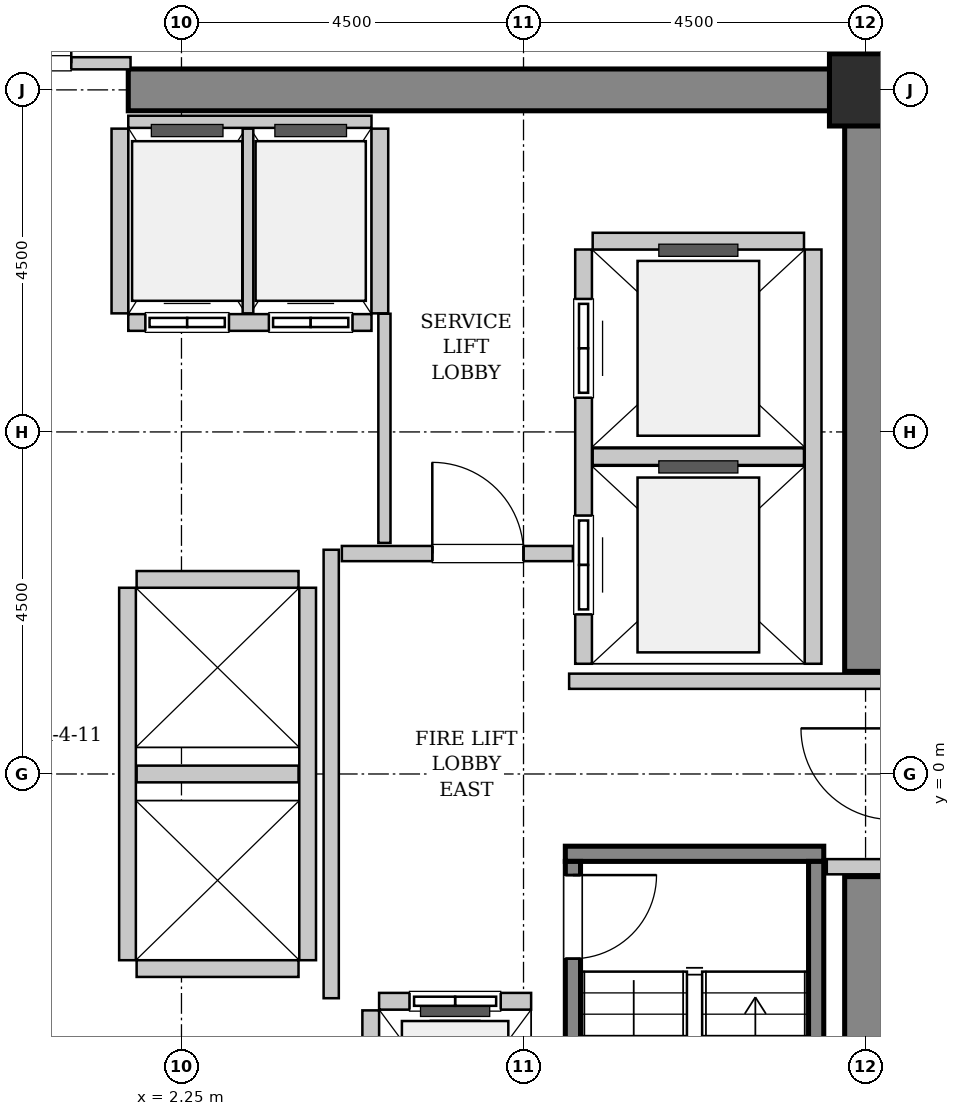
"""IFC4 building model, lengths in metres.
Left out: names, types, materials, properties, quantities, classifications, styles, units other than length and angle.
Written with IfcOpenShell. Run it as: python <this file> out.ifc"""

import sys

from ifc_helpers import new_model, si_unit, direction, frame, frame_2d, origin, origin_2d, place, context, subcontext, project, spatial, rectangle, hollow_rectangle, extrude, source, transform, mapped, element, fill, save


model = new_model("IFC4")
c1 = context("Model", 3, precision=1e-05, world=origin(), true_north=direction((0.0, 1.0)))
c2 = subcontext(c1, "Body", "Model", "MODEL_VIEW")
j1 = project(units=[si_unit("LENGTHUNIT", "METRE"), si_unit("PLANEANGLEUNIT", "RADIAN")], contexts=[c1])
p1 = place(None, origin())
s1 = spatial("IfcSite", under=j1, at=p1, CompositionType="ELEMENT")
p2 = place(p1, origin())
s2 = spatial("IfcBuilding", under=s1, at=p2, CompositionType="ELEMENT")
p3 = place(p2, frame((0.0, 0.0, 102.2)))
s3 = spatial("IfcBuildingStorey", under=s2, at=p3, CompositionType="ELEMENT", Elevation=102.2)
m1 = source(origin(), c2, "Body", "SweptSolid", [
    extrude(rectangle(XDim=9.975, YDim=0.55, at=frame_2d((4.987, 0.0))), origin(), (0.0, 0.0, 1.0), 3.8),
])
p4 = place(p3, frame((1.55, 9.0, 0.0), z_axis=(0.0, 0.0, 1.0), x_axis=(1.0, 0.0, 0.0)))
e1 = element("IfcWall", 1, at=p4, inside=s3, PredefinedType="SHEAR", context=c2, shape_type="MappedRepresentation", body=[
    mapped(m1, transform((0.0, 0.0, 0.0), x_axis=(1.0, 0.0, 0.0), y_axis=(0.0, 1.0, 0.0), z_axis=(0.0, 0.0, 1.0), scale=1.0)),
])
m2 = source(origin(), c2, "Body", "SweptSolid", [
    extrude(rectangle(XDim=7.375, YDim=0.55, at=frame_2d((3.688, 0.0))), origin(), (0.0, 0.0, 1.0), 3.8),
])
for number, where, z_axis, x_axis in (
    (2, (11.25, -8.725, 0.0), (0.0, 0.0, 1.0), (0.0, 1.0, 0.0)),
    (3, (11.25, 1.35, 0.0), (0.0, 0.0, 1.0), (0.0, 1.0, 0.0)),
):
    element("IfcWall", number, at=place(p3, frame(where, z_axis=z_axis, x_axis=x_axis)), inside=s3, PredefinedType="SHEAR", context=c2, shape_type="MappedRepresentation", body=[
        mapped(m2, transform((0.0, 0.0, 0.0), x_axis=(1.0, 0.0, 0.0), y_axis=(0.0, 1.0, 0.0), z_axis=(0.0, 0.0, 1.0), scale=1.0)),
    ])
m3 = source(origin(), c2, "Body", "SweptSolid", [
    extrude(hollow_rectangle(XDim=0.95, YDim=0.95, WallThickness=0.045, InnerFilletRadius=0.045, OuterFilletRadius=0.09, at=origin_2d()), origin(), (0.0, 0.0, 1.0), 3.8),
])
p5 = place(p3, frame((11.25, 9.0, 0.0), z_axis=(0.0, 0.0, 1.0), x_axis=(1.0, 0.0, 0.0)))
e4 = element("IfcColumn", 4, at=p5, inside=s3, PredefinedType="COLUMN", context=c2, shape_type="MappedRepresentation", body=[
    mapped(m3, transform((0.0, 0.0, 0.0), x_axis=(1.0, 0.0, 0.0), y_axis=(0.0, 1.0, 0.0), z_axis=(0.0, 0.0, 1.0), scale=1.0)),
])
m4 = source(origin(), c2, "Body", "SweptSolid", [
    extrude(rectangle(XDim=3.4, YDim=0.2, at=frame_2d((1.7, 0.0))), origin(), (0.0, 0.0, 1.0), 3.8),
])
p6 = place(p3, frame((7.3, -1.05, 0.0), z_axis=(0.0, 0.0, 1.0), x_axis=(1.0, 0.0, 0.0)))
e5 = element("IfcWall", 5, at=p6, inside=s3, PredefinedType="SOLIDWALL", context=c2, shape_type="MappedRepresentation", body=[
    mapped(m4, transform((0.0, 0.0, 0.0), x_axis=(1.0, 0.0, 0.0), y_axis=(0.0, 1.0, 0.0), z_axis=(0.0, 0.0, 1.0), scale=1.0)),
])
m5 = source(origin(), c2, "Body", "SweptSolid", [
    extrude(rectangle(XDim=7.1, YDim=0.2, at=frame_2d((3.55, 0.0))), origin(), (0.0, 0.0, 1.0), 3.8),
])
p7 = place(p3, frame((7.4, -1.15, 0.0), z_axis=(0.0, 0.0, 1.0), x_axis=(0.0, -1.0, 0.0)))
e6 = element("IfcWall", 6, at=p7, inside=s3, PredefinedType="SOLIDWALL", context=c2, shape_type="MappedRepresentation", body=[
    mapped(m5, transform((0.0, 0.0, 0.0), x_axis=(1.0, 0.0, 0.0), y_axis=(0.0, 1.0, 0.0), z_axis=(0.0, 0.0, 1.0), scale=1.0)),
])
p8 = place(p7, frame((0.18, 0.0, 0.0)))
e7 = element("IfcOpeningElement", 7, at=p8, cuts=e6, PredefinedType="OPENING", context=c2, shape_type="SweptSolid", body=[
    extrude(rectangle(XDim=1.1, YDim=2.15, at=frame_2d((0.55, 1.075))), frame((0.0, 0.11, 0.0), z_axis=(0.0, -1.0, 0.0), x_axis=(1.0, 0.0, 0.0)), (0.0, 0.0, 1.0), 0.22),
])
p9 = place(p3, frame((10.6, -1.15, 0.0), z_axis=(0.0, 0.0, 1.0), x_axis=(0.0, -1.0, 0.0)))
e8 = element("IfcWall", 8, at=p9, inside=s3, PredefinedType="SOLIDWALL", context=c2, shape_type="MappedRepresentation", body=[
    mapped(m5, transform((0.0, 0.0, 0.0), x_axis=(1.0, 0.0, 0.0), y_axis=(0.0, 1.0, 0.0), z_axis=(0.0, 0.0, 1.0), scale=1.0)),
])
m6 = source(origin(), c2, "Body", "SweptSolid", [
    extrude(rectangle(XDim=2.0, YDim=0.22, at=frame_2d((1.0, 0.0))), origin(), (0.0, 0.0, 1.0), 3.535),
])
p10 = place(p3, frame((6.85, -2.99, 0.0), z_axis=(0.0, 0.0, 1.0), x_axis=(-1.0, 0.0, 0.0)))
e9 = element("IfcWall", 9, at=p10, inside=s3, PredefinedType="SOLIDWALL", context=c2, shape_type="MappedRepresentation", body=[
    mapped(m6, transform((0.0, 0.0, 0.0), x_axis=(1.0, 0.0, 0.0), y_axis=(0.0, 1.0, 0.0), z_axis=(0.0, 0.0, 1.0), scale=1.0)),
])
p11 = place(p10, frame((0.4, 0.0, 0.0)))
e10 = element("IfcOpeningElement", 10, at=p11, cuts=e9, PredefinedType="OPENING", context=c2, shape_type="SweptSolid", body=[
    extrude(rectangle(XDim=1.2, YDim=2.2, at=frame_2d((0.6, 1.1))), frame((0.0, 0.12, 0.0), z_axis=(0.0, -1.0, 0.0), x_axis=(1.0, 0.0, 0.0)), (0.0, 0.0, 1.0), 0.24),
])
m7 = source(origin(), c2, "Body", "SweptSolid", [
    extrude(rectangle(XDim=2.68, YDim=0.22, at=frame_2d((1.34, 0.0))), origin(), (0.0, 0.0, 1.0), 3.535),
])
p12 = place(p3, frame((4.74, -3.11, 0.0), z_axis=(0.0, 0.0, 1.0), x_axis=(0.0, -1.0, 0.0)))
e11 = element("IfcWall", 11, at=p12, inside=s3, PredefinedType="SOLIDWALL", context=c2, shape_type="MappedRepresentation", body=[
    mapped(m7, transform((0.0, 0.0, 0.0), x_axis=(1.0, 0.0, 0.0), y_axis=(0.0, 1.0, 0.0), z_axis=(0.0, 0.0, 1.0), scale=1.0)),
])
m8 = source(origin(), c2, "Body", "SweptSolid", [
    extrude(rectangle(XDim=5.45, YDim=0.22, at=frame_2d((2.725, 0.0))), origin(), (0.0, 0.0, 1.0), 3.535),
])
p13 = place(p3, frame((7.54, 6.9, 0.0), z_axis=(0.0, 0.0, 1.0), x_axis=(0.0, -1.0, 0.0)))
e12 = element("IfcWall", 12, at=p13, inside=s3, PredefinedType="SOLIDWALL", context=c2, shape_type="MappedRepresentation", body=[
    mapped(m8, transform((0.0, 0.0, 0.0), x_axis=(1.0, 0.0, 0.0), y_axis=(0.0, 1.0, 0.0), z_axis=(0.0, 0.0, 1.0), scale=1.0)),
])
p14 = place(p13, frame((3.5, 0.0, 0.0)))
e13 = element("IfcOpeningElement", 13, at=p14, cuts=e12, PredefinedType="OPENING", context=c2, shape_type="SweptSolid", body=[
    extrude(rectangle(XDim=1.3, YDim=2.3, at=frame_2d((0.65, 1.15))), frame((0.0, 0.12, 0.0), z_axis=(0.0, -1.0, 0.0), x_axis=(1.0, 0.0, 0.0)), (0.0, 0.0, 1.0), 0.24),
])
p15 = place(p13, frame((0.65, 0.0, 0.0)))
e14 = element("IfcOpeningElement", 14, at=p15, cuts=e12, PredefinedType="OPENING", context=c2, shape_type="SweptSolid", body=[
    extrude(rectangle(XDim=1.3, YDim=2.3, at=frame_2d((0.65, 1.15))), frame((0.0, 0.12, 0.0), z_axis=(0.0, -1.0, 0.0), x_axis=(1.0, 0.0, 0.0)), (0.0, 0.0, 1.0), 0.24),
])
p16 = place(p3, frame((10.56, 1.45, 0.0), z_axis=(0.0, 0.0, 1.0), x_axis=(0.0, 1.0, 0.0)))
e15 = element("IfcWall", 15, at=p16, inside=s3, PredefinedType="SOLIDWALL", context=c2, shape_type="MappedRepresentation", body=[
    mapped(m8, transform((0.0, 0.0, 0.0), x_axis=(1.0, 0.0, 0.0), y_axis=(0.0, 1.0, 0.0), z_axis=(0.0, 0.0, 1.0), scale=1.0)),
])
m9 = source(origin(), c2, "Body", "SweptSolid", [
    extrude(rectangle(XDim=2.78, YDim=0.22, at=frame_2d((1.39, 0.0))), origin(), (0.0, 0.0, 1.0), 3.535),
])
for number, where, z_axis, x_axis in (
    (16, (7.66, 4.175, 0.0), (0.0, 0.0, 1.0), (1.0, 0.0, 0.0)),
    (17, (10.44, 7.01, 0.0), (0.0, 0.0, 1.0), (-1.0, 0.0, 0.0)),
):
    element("IfcWall", number, at=place(p3, frame(where, z_axis=z_axis, x_axis=x_axis)), inside=s3, PredefinedType="SOLIDWALL", context=c2, shape_type="MappedRepresentation", body=[
        mapped(m9, transform((0.0, 0.0, 0.0), x_axis=(1.0, 0.0, 0.0), y_axis=(0.0, 1.0, 0.0), z_axis=(0.0, 0.0, 1.0), scale=1.0)),
    ])
m10 = source(origin(), c2, "Body", "SweptSolid", [
    extrude(rectangle(XDim=3.2, YDim=0.22, at=frame_2d((1.6, 0.0))), origin(), (0.0, 0.0, 1.0), 3.535),
])
p17 = place(p3, frame((1.55, 5.94, 0.0), z_axis=(0.0, 0.0, 1.0), x_axis=(1.0, 0.0, 0.0)))
e18 = element("IfcWall", 18, at=p17, inside=s3, PredefinedType="SOLIDWALL", context=c2, shape_type="MappedRepresentation", body=[
    mapped(m10, transform((0.0, 0.0, 0.0), x_axis=(1.0, 0.0, 0.0), y_axis=(0.0, 1.0, 0.0), z_axis=(0.0, 0.0, 1.0), scale=1.0)),
])
p18 = place(p17, frame((0.225, 0.0, 0.0)))
e19 = element("IfcOpeningElement", 19, at=p18, cuts=e18, PredefinedType="OPENING", context=c2, shape_type="SweptSolid", body=[
    extrude(rectangle(XDim=1.1, YDim=2.2, at=frame_2d((0.55, 1.1))), frame((0.0, 0.12, 0.0), z_axis=(0.0, -1.0, 0.0), x_axis=(1.0, 0.0, 0.0)), (0.0, 0.0, 1.0), 0.24),
])
p19 = place(p17, frame((1.85, 0.0, 0.0)))
e20 = element("IfcOpeningElement", 20, at=p19, cuts=e18, PredefinedType="OPENING", context=c2, shape_type="SweptSolid", body=[
    extrude(rectangle(XDim=1.1, YDim=2.2, at=frame_2d((0.55, 1.1))), frame((0.0, 0.12, 0.0), z_axis=(0.0, -1.0, 0.0), x_axis=(1.0, 0.0, 0.0)), (0.0, 0.0, 1.0), 0.24),
])
m11 = source(origin(), c2, "Body", "SweptSolid", [
    extrude(rectangle(XDim=3.2, YDim=0.16, at=frame_2d((1.6, 0.0))), origin(), (0.0, 0.0, 1.0), 2.425),
])
p20 = place(p3, frame((4.75, 8.58, 0.0), z_axis=(0.0, 0.0, 1.0), x_axis=(-1.0, 0.0, 0.0)))
e21 = element("IfcWall", 21, at=p20, inside=s3, PredefinedType="PARTITIONING", context=c2, shape_type="MappedRepresentation", body=[
    mapped(m11, transform((0.0, 0.0, 0.0), x_axis=(1.0, 0.0, 0.0), y_axis=(0.0, 1.0, 0.0), z_axis=(0.0, 0.0, 1.0), scale=1.0)),
])
m12 = source(origin(), c2, "Body", "SweptSolid", [
    extrude(rectangle(XDim=2.43, YDim=0.22, at=frame_2d((1.215, 0.0))), origin(), (0.0, 0.0, 1.0), 3.535),
])
p21 = place(p3, frame((1.44, 8.49, 0.0), z_axis=(0.0, 0.0, 1.0), x_axis=(0.0, -1.0, 0.0)))
e22 = element("IfcWall", 22, at=p21, inside=s3, PredefinedType="SOLIDWALL", context=c2, shape_type="MappedRepresentation", body=[
    mapped(m12, transform((0.0, 0.0, 0.0), x_axis=(1.0, 0.0, 0.0), y_axis=(0.0, 1.0, 0.0), z_axis=(0.0, 0.0, 1.0), scale=1.0)),
])
m13 = source(origin(), c2, "Body", "SweptSolid", [
    extrude(rectangle(XDim=2.43, YDim=0.14, at=frame_2d((1.215, 0.0))), origin(), (0.0, 0.0, 1.0), 3.535),
])
p22 = place(p3, frame((3.125, 6.06, 0.0), z_axis=(0.0, 0.0, 1.0), x_axis=(0.0, 1.0, 0.0)))
e23 = element("IfcWall", 23, at=p22, inside=s3, PredefinedType="PARTITIONING", context=c2, shape_type="MappedRepresentation", body=[
    mapped(m13, transform((0.0, 0.0, 0.0), x_axis=(1.0, 0.0, 0.0), y_axis=(0.0, 1.0, 0.0), z_axis=(0.0, 0.0, 1.0), scale=1.0)),
])
p23 = place(p3, frame((4.86, 6.06, 0.0), z_axis=(0.0, 0.0, 1.0), x_axis=(0.0, 1.0, 0.0)))
e24 = element("IfcWall", 24, at=p23, inside=s3, PredefinedType="SOLIDWALL", context=c2, shape_type="MappedRepresentation", body=[
    mapped(m12, transform((0.0, 0.0, 0.0), x_axis=(1.0, 0.0, 0.0), y_axis=(0.0, 1.0, 0.0), z_axis=(0.0, 0.0, 1.0), scale=1.0)),
])
m14 = source(origin(), c2, "Body", "SweptSolid", [
    extrude(rectangle(XDim=4.9, YDim=0.22, at=frame_2d((2.45, 0.0))), origin(), (0.0, 0.0, 1.0), 3.535),
])
for number, where, z_axis, x_axis in (
    (25, (1.54, 2.45, 0.0), (0.0, 0.0, 1.0), (0.0, -1.0, 0.0)),
    (26, (3.91, -2.45, 0.0), (0.0, 0.0, 1.0), (0.0, 1.0, 0.0)),
):
    element("IfcWall", number, at=place(p3, frame(where, z_axis=z_axis, x_axis=x_axis)), inside=s3, PredefinedType="SOLIDWALL", context=c2, shape_type="MappedRepresentation", body=[
        mapped(m14, transform((0.0, 0.0, 0.0), x_axis=(1.0, 0.0, 0.0), y_axis=(0.0, 1.0, 0.0), z_axis=(0.0, 0.0, 1.0), scale=1.0)),
    ])
m15 = source(origin(), c2, "Body", "SweptSolid", [
    extrude(rectangle(XDim=2.13, YDim=0.22, at=frame_2d((1.065, 0.0))), origin(), (0.0, 0.0, 1.0), 3.535),
])
for number, where, z_axis, x_axis in (
    (27, (1.66, -2.56, 0.0), (0.0, 0.0, 1.0), (1.0, 0.0, 0.0)),
    (28, (1.66, 0.0, 0.0), (0.0, 0.0, 1.0), (1.0, 0.0, 0.0)),
    (29, (3.79, 2.56, 0.0), (0.0, 0.0, 1.0), (-1.0, 0.0, 0.0)),
):
    element("IfcWall", number, at=place(p3, frame(where, z_axis=z_axis, x_axis=x_axis)), inside=s3, PredefinedType="SOLIDWALL", context=c2, shape_type="MappedRepresentation", body=[
        mapped(m15, transform((0.0, 0.0, 0.0), x_axis=(1.0, 0.0, 0.0), y_axis=(0.0, 1.0, 0.0), z_axis=(0.0, 0.0, 1.0), scale=1.0)),
    ])
m16 = source(origin(), c2, "Body", "SweptSolid", [
    extrude(rectangle(XDim=5.9, YDim=0.2, at=frame_2d((2.95, 0.0))), origin(), (0.0, 0.0, 1.0), 3.535),
])
p24 = place(p3, frame((4.22, -2.95, 0.0), z_axis=(0.0, 0.0, 1.0), x_axis=(0.0, 1.0, 0.0)))
e30 = element("IfcWall", 30, at=p24, inside=s3, PredefinedType="PARTITIONING", context=c2, shape_type="MappedRepresentation", body=[
    mapped(m16, transform((0.0, 0.0, 0.0), x_axis=(1.0, 0.0, 0.0), y_axis=(0.0, 1.0, 0.0), z_axis=(0.0, 0.0, 1.0), scale=1.0)),
])
m17 = source(origin(), c2, "Body", "SweptSolid", [
    extrude(rectangle(XDim=3.04, YDim=0.2, at=frame_2d((1.52, 0.0))), origin(), (0.0, 0.0, 1.0), 3.535),
])
p25 = place(p3, frame((4.36, 2.9, 0.0), z_axis=(0.0, 0.0, 1.0), x_axis=(1.0, 0.0, 0.0)))
e31 = element("IfcWall", 31, at=p25, inside=s3, PredefinedType="PARTITIONING", context=c2, shape_type="MappedRepresentation", body=[
    mapped(m17, transform((0.0, 0.0, 0.0), x_axis=(1.0, 0.0, 0.0), y_axis=(0.0, 1.0, 0.0), z_axis=(0.0, 0.0, 1.0), scale=1.0)),
])
p26 = place(p25, frame((1.19, 0.0, 0.0)))
e32 = element("IfcOpeningElement", 32, at=p26, cuts=e31, PredefinedType="OPENING", context=c2, shape_type="SweptSolid", body=[
    extrude(rectangle(XDim=1.2, YDim=2.15, at=frame_2d((0.6, 1.075))), frame((0.0, 0.11, 0.0), z_axis=(0.0, -1.0, 0.0), x_axis=(1.0, 0.0, 0.0)), (0.0, 0.0, 1.0), 0.22),
])
m18 = source(origin(), c2, "Body", "SweptSolid", [
    extrude(rectangle(XDim=4.11, YDim=0.2, at=frame_2d((2.055, 0.0))), origin(), (0.0, 0.0, 1.0), 3.535),
])
p27 = place(p3, frame((7.35, 1.22, 0.0), z_axis=(0.0, 0.0, 1.0), x_axis=(1.0, 0.0, 0.0)))
e33 = element("IfcWall", 33, at=p27, inside=s3, PredefinedType="PARTITIONING", context=c2, shape_type="MappedRepresentation", body=[
    mapped(m18, transform((0.0, 0.0, 0.0), x_axis=(1.0, 0.0, 0.0), y_axis=(0.0, 1.0, 0.0), z_axis=(0.0, 0.0, 1.0), scale=1.0)),
])
m19 = source(origin(), c2, "Body", "SweptSolid", [
    extrude(rectangle(XDim=0.72, YDim=0.2, at=frame_2d((0.36, 0.0))), origin(), (0.0, 0.0, 1.0), 3.535),
])
p28 = place(p3, frame((10.74, -1.22, 0.0), z_axis=(0.0, 0.0, 1.0), x_axis=(1.0, 0.0, 0.0)))
e34 = element("IfcWall", 34, at=p28, inside=s3, PredefinedType="PARTITIONING", context=c2, shape_type="MappedRepresentation", body=[
    mapped(m19, transform((0.0, 0.0, 0.0), x_axis=(1.0, 0.0, 0.0), y_axis=(0.0, 1.0, 0.0), z_axis=(0.0, 0.0, 1.0), scale=1.0)),
])
m20 = source(origin(), c2, "Body", "SweptSolid", [
    extrude(rectangle(XDim=3.16, YDim=0.16, at=frame_2d((1.58, 0.0))), origin(), (0.0, 0.0, 1.0), 2.425),
])
p29 = place(p3, frame((-1.58, 9.35, 0.0), z_axis=(0.0, 0.0, 1.0), x_axis=(1.0, 0.0, 0.0)))
e35 = element("IfcWall", 35, at=p29, inside=s3, PredefinedType="PARTITIONING", context=c2, shape_type="MappedRepresentation", body=[
    mapped(m20, transform((0.0, 0.0, 0.0), x_axis=(1.0, 0.0, 0.0), y_axis=(0.0, 1.0, 0.0), z_axis=(0.0, 0.0, 1.0), scale=1.0)),
])
p30 = place(p29, frame((0.78, 0.0, 0.0)))
e36 = element("IfcOpeningElement", 36, at=p30, cuts=e35, PredefinedType="OPENING", context=c2, shape_type="SweptSolid", body=[
    extrude(rectangle(XDim=1.6, YDim=2.3, at=frame_2d((0.8, 1.15))), frame((0.0, 0.09, 0.0), z_axis=(0.0, -1.0, 0.0), x_axis=(1.0, 0.0, 0.0)), (0.0, 0.0, 1.0), 0.18),
])
m21 = source(origin(), c2, "Body", "SweptSolid", [
    extrude(rectangle(XDim=3.015, YDim=0.16, at=frame_2d((1.507, 0.0))), origin(), (0.0, 0.0, 1.0), 3.535),
])
p31 = place(p3, frame((4.92, 3.04, 0.0), z_axis=(0.0, 0.0, 1.0), x_axis=(0.0, 1.0, 0.0)))
e37 = element("IfcWall", 37, at=p31, inside=s3, PredefinedType="PARTITIONING", context=c2, shape_type="MappedRepresentation", body=[
    mapped(m21, transform((0.0, 0.0, 0.0), x_axis=(1.0, 0.0, 0.0), y_axis=(0.0, 1.0, 0.0), z_axis=(0.0, 0.0, 1.0), scale=1.0)),
])
m22 = source(origin(), c2, "Body", "SweptSolid", [
    extrude(rectangle(XDim=1.1, YDim=2.15, at=frame_2d((0.55, 1.075))), frame((0.0, 0.025, 0.0), z_axis=(0.0, -1.0, 0.0), x_axis=(1.0, 0.0, 0.0)), (0.0, 0.0, 1.0), 0.05),
])
p32 = place(p8, origin())
e38 = element("IfcDoor", 38, at=p32, inside=s3, OperationType="SINGLE_SWING_LEFT", PredefinedType="DOOR", context=c2, shape_type="MappedRepresentation", body=[
    mapped(m22, transform((0.0, 0.0, 0.0), x_axis=(1.0, 0.0, 0.0), y_axis=(0.0, 1.0, 0.0), z_axis=(0.0, 0.0, 1.0), scale=1.0)),
])
fill(e7, e38)
m23 = source(origin(), c2, "Body", "SweptSolid", [
    extrude(rectangle(XDim=1.2, YDim=2.2, at=frame_2d((0.6, 1.1))), frame((0.0, 0.025, 0.0), z_axis=(0.0, -1.0, 0.0), x_axis=(1.0, 0.0, 0.0)), (0.0, 0.0, 1.0), 0.05),
])
p33 = place(p11, origin())
e39 = element("IfcDoor", 39, at=p33, inside=s3, OperationType="SLIDING_TO_LEFT", PredefinedType="DOOR", context=c2, shape_type="MappedRepresentation", body=[
    mapped(m23, transform((0.0, 0.0, 0.0), x_axis=(1.0, 0.0, 0.0), y_axis=(0.0, 1.0, 0.0), z_axis=(0.0, 0.0, 1.0), scale=1.0)),
])
fill(e10, e39)
m24 = source(origin(), c2, "Body", "SweptSolid", [
    extrude(rectangle(XDim=1.3, YDim=2.3, at=frame_2d((0.65, 1.15))), frame((0.0, 0.025, 0.0), z_axis=(0.0, -1.0, 0.0), x_axis=(1.0, 0.0, 0.0)), (0.0, 0.0, 1.0), 0.05),
])
p34 = place(p14, origin())
e40 = element("IfcDoor", 40, at=p34, inside=s3, OperationType="SLIDING_TO_RIGHT", PredefinedType="DOOR", context=c2, shape_type="MappedRepresentation", body=[
    mapped(m24, transform((0.0, 0.0, 0.0), x_axis=(1.0, 0.0, 0.0), y_axis=(0.0, 1.0, 0.0), z_axis=(0.0, 0.0, 1.0), scale=1.0)),
])
fill(e13, e40)
p35 = place(p15, origin())
e41 = element("IfcDoor", 41, at=p35, inside=s3, OperationType="SLIDING_TO_RIGHT", PredefinedType="DOOR", context=c2, shape_type="MappedRepresentation", body=[
    mapped(m24, transform((0.0, 0.0, 0.0), x_axis=(1.0, 0.0, 0.0), y_axis=(0.0, 1.0, 0.0), z_axis=(0.0, 0.0, 1.0), scale=1.0)),
])
fill(e14, e41)
m25 = source(origin(), c2, "Body", "SweptSolid", [
    extrude(rectangle(XDim=1.1, YDim=2.2, at=frame_2d((0.55, 1.1))), frame((0.0, 0.025, 0.0), z_axis=(0.0, -1.0, 0.0), x_axis=(1.0, 0.0, 0.0)), (0.0, 0.0, 1.0), 0.05),
])
p36 = place(p18, origin())
e42 = element("IfcDoor", 42, at=p36, inside=s3, OperationType="DOUBLE_DOOR_SLIDING", PredefinedType="DOOR", context=c2, shape_type="MappedRepresentation", body=[
    mapped(m25, transform((0.0, 0.0, 0.0), x_axis=(1.0, 0.0, 0.0), y_axis=(0.0, 1.0, 0.0), z_axis=(0.0, 0.0, 1.0), scale=1.0)),
])
fill(e19, e42)
p37 = place(p19, origin())
e43 = element("IfcDoor", 43, at=p37, inside=s3, OperationType="DOUBLE_DOOR_SLIDING", PredefinedType="DOOR", context=c2, shape_type="MappedRepresentation", body=[
    mapped(m25, transform((0.0, 0.0, 0.0), x_axis=(1.0, 0.0, 0.0), y_axis=(0.0, 1.0, 0.0), z_axis=(0.0, 0.0, 1.0), scale=1.0)),
])
fill(e20, e43)
m26 = source(origin(), c2, "Body", "SweptSolid", [
    extrude(rectangle(XDim=1.2, YDim=2.15, at=frame_2d((0.6, 1.075))), frame((0.0, 0.025, 0.0), z_axis=(0.0, -1.0, 0.0), x_axis=(1.0, 0.0, 0.0)), (0.0, 0.0, 1.0), 0.05),
])
p38 = place(p26, origin())
e44 = element("IfcDoor", 44, at=p38, inside=s3, OperationType="SINGLE_SWING_LEFT", PredefinedType="DOOR", context=c2, shape_type="MappedRepresentation", body=[
    mapped(m26, transform((0.0, 0.0, 0.0), x_axis=(1.0, 0.0, 0.0), y_axis=(0.0, 1.0, 0.0), z_axis=(0.0, 0.0, 1.0), scale=1.0)),
])
fill(e32, e44)
m27 = source(origin(), c2, "Body", "SweptSolid", [
    extrude(rectangle(XDim=1.6, YDim=2.3, at=frame_2d((0.8, 1.15))), frame((0.0, 0.025, 0.0), z_axis=(0.0, -1.0, 0.0), x_axis=(1.0, 0.0, 0.0)), (0.0, 0.0, 1.0), 0.05),
])
p39 = place(p30, origin())
e45 = element("IfcDoor", 45, at=p39, inside=s3, OperationType="DOUBLE_DOOR_SINGLE_SWING", PredefinedType="DOOR", context=c2, shape_type="MappedRepresentation", body=[
    mapped(m27, transform((0.0, 0.0, 0.0), x_axis=(1.0, 0.0, 0.0), y_axis=(0.0, 1.0, 0.0), z_axis=(0.0, 0.0, 1.0), scale=1.0)),
])
fill(e36, e45)
save(model, sys.argv[1])
